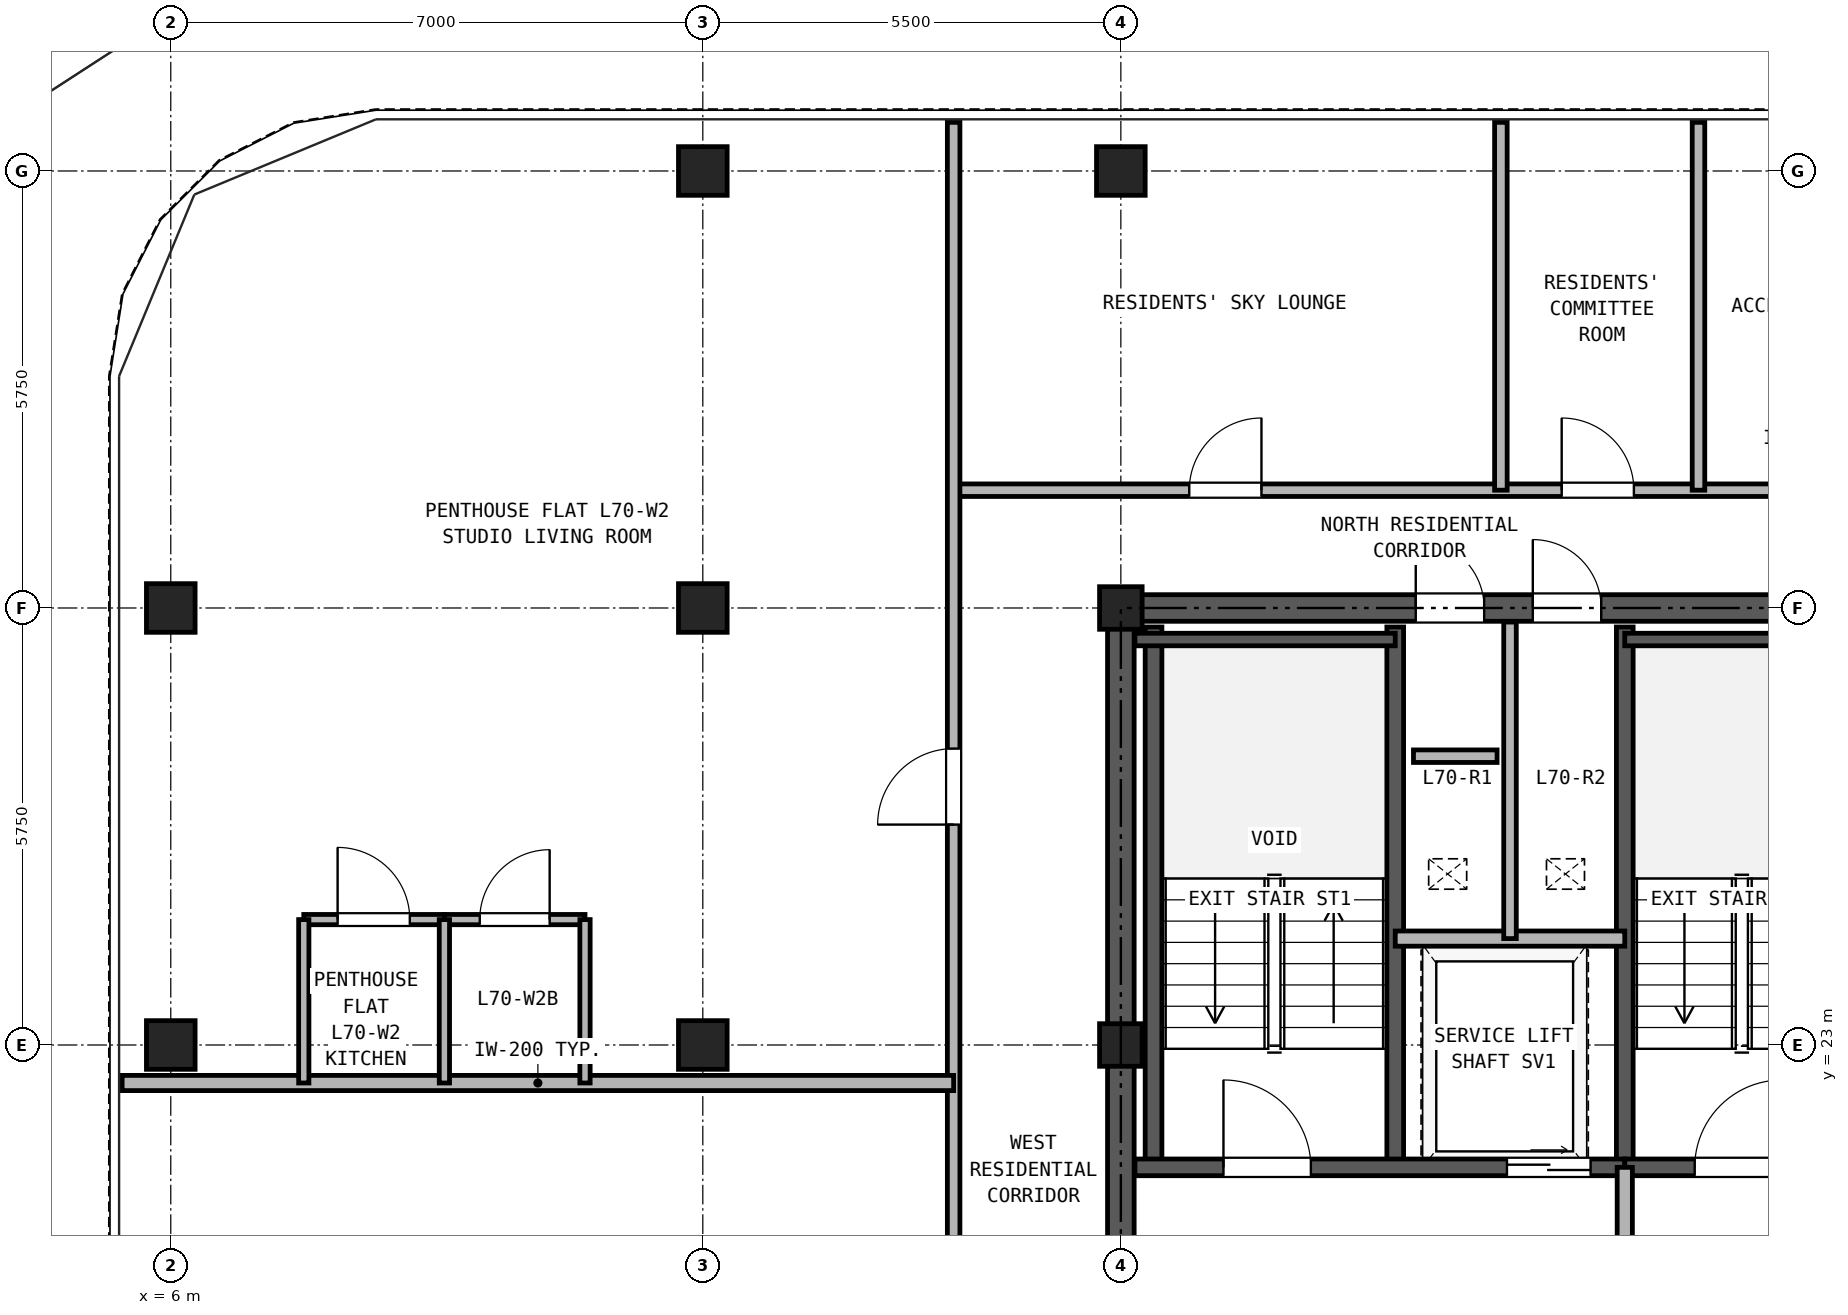
"""IFC4 building model, lengths in metres.
Left out: names, types, materials, properties, quantities, classifications, styles, units other than length and angle.
Written with IfcOpenShell. Run it as: python <this file> out.ifc"""

import sys

from ifc_helpers import new_model, si_unit, direction, frame, frame_2d, origin, origin_2d, place, context, subcontext, project, spatial, rectangle, hollow_rectangle, extrude, source, transform, mapped, element, fill, save


model = new_model("IFC4")
c1 = context("Model", 3, precision=1e-05, world=origin(), true_north=direction((0.0, 1.0)))
c2 = subcontext(c1, "Body", "Model", "MODEL_VIEW")
j1 = project(units=[si_unit("LENGTHUNIT", "METRE"), si_unit("PLANEANGLEUNIT", "RADIAN")], contexts=[c1])
p1 = place(None, origin())
s1 = spatial("IfcSite", under=j1, at=p1, CompositionType="ELEMENT")
p2 = place(p1, origin())
s2 = spatial("IfcBuilding", under=s1, at=p2, CompositionType="ELEMENT")
p3 = place(p2, frame((0.0, 0.0, 245.7)))
s3 = spatial("IfcBuildingStorey", under=s2, at=p3, CompositionType="ELEMENT", Elevation=245.7)
m1 = source(origin(), c2, "Body", "SweptSolid", [
    extrude(hollow_rectangle(XDim=0.64, YDim=0.64, WallThickness=0.035, at=origin_2d()), origin(), (0.0, 0.0, 1.0), 2.98),
])
for number, where, z_axis, x_axis in (
    (1, (13.0, 34.5, 0.0), (0.0, 0.0, 1.0), (1.0, 0.0, 0.0)),
    (2, (18.5, 34.5, 0.0), (0.0, 0.0, 1.0), (1.0, 0.0, 0.0)),
    (3, (6.0, 23.0, 0.0), (0.0, 0.0, 1.0), (1.0, 0.0, 0.0)),
    (4, (6.0, 28.75, 0.0), (0.0, 0.0, 1.0), (1.0, 0.0, 0.0)),
    (5, (13.0, 23.0, 0.0), (0.0, 0.0, 1.0), (1.0, 0.0, 0.0)),
    (6, (13.0, 28.75, 0.0), (0.0, 0.0, 1.0), (1.0, 0.0, 0.0)),
):
    element("IfcColumn", number, at=place(p3, frame(where, z_axis=z_axis, x_axis=x_axis)), inside=s3, PredefinedType="COLUMN", context=c2, shape_type="MappedRepresentation", body=[
        mapped(m1, transform((0.0, 0.0, 0.0), x_axis=(1.0, 0.0, 0.0), y_axis=(0.0, 1.0, 0.0), z_axis=(0.0, 0.0, 1.0), scale=1.0)),
    ])
m2 = source(origin(), c2, "Body", "SweptSolid", [
    extrude(hollow_rectangle(XDim=0.56, YDim=0.56, WallThickness=0.03, at=origin_2d()), origin(), (0.0, 0.0, 1.0), 2.98),
])
for number, where, z_axis, x_axis in (
    (7, (18.5, 23.0, 0.0), (0.0, 0.0, 1.0), (1.0, 0.0, 0.0)),
    (8, (18.5, 28.75, 0.0), (0.0, 0.0, 1.0), (1.0, 0.0, 0.0)),
):
    element("IfcColumn", number, at=place(p3, frame(where, z_axis=z_axis, x_axis=x_axis)), inside=s3, PredefinedType="COLUMN", context=c2, shape_type="MappedRepresentation", body=[
        mapped(m2, transform((0.0, 0.0, 0.0), x_axis=(1.0, 0.0, 0.0), y_axis=(0.0, 1.0, 0.0), z_axis=(0.0, 0.0, 1.0), scale=1.0)),
    ])
p4 = place(p3, frame((18.325, 28.75, 0.0), z_axis=(0.0, 0.0, 1.0), x_axis=(1.0, 0.0, 0.0)))
e9 = element("IfcWall", 9, at=p4, inside=s3, PredefinedType="SHEAR", context=c2, shape_type="SweptSolid", body=[
    extrude(rectangle(XDim=10.35, YDim=0.35, at=frame_2d((5.175, 0.0))), origin(), (0.0, 0.0, 1.0), 2.98),
])
p5 = place(p4, frame((4.055, 0.0, 0.0)))
e10 = element("IfcOpeningElement", 10, at=p5, cuts=e9, PredefinedType="OPENING", context=c2, shape_type="SweptSolid", body=[
    extrude(rectangle(XDim=0.9, YDim=2.05, at=frame_2d((0.45, 1.025))), frame((0.0, 0.185, 0.0), z_axis=(0.0, -1.0, 0.0), x_axis=(1.0, 0.0, 0.0)), (0.0, 0.0, 1.0), 0.37),
])
p6 = place(p4, frame((5.595, 0.0, 0.0)))
e11 = element("IfcOpeningElement", 11, at=p6, cuts=e9, PredefinedType="OPENING", context=c2, shape_type="SweptSolid", body=[
    extrude(rectangle(XDim=0.9, YDim=2.05, at=frame_2d((0.45, 1.025))), frame((0.0, 0.185, 0.0), z_axis=(0.0, -1.0, 0.0), x_axis=(1.0, 0.0, 0.0)), (0.0, 0.0, 1.0), 0.37),
])
p7 = place(p3, frame((18.5, 11.675, 0.0), z_axis=(0.0, 0.0, 1.0), x_axis=(0.0, 1.0, 0.0)))
e12 = element("IfcWall", 12, at=p7, inside=s3, PredefinedType="SHEAR", context=c2, shape_type="SweptSolid", body=[
    extrude(rectangle(XDim=16.9, YDim=0.35, at=frame_2d((8.45, 0.0))), origin(), (0.0, 0.0, 1.0), 2.98),
])
p8 = place(p7, frame((7.475, 0.0, 0.0)))
e13 = element("IfcOpeningElement", 13, at=p8, cuts=e12, PredefinedType="OPENING", context=c2, shape_type="SweptSolid", body=[
    extrude(rectangle(XDim=1.15, YDim=2.2, at=frame_2d((0.575, 1.1))), frame((0.0, 0.185, 0.0), z_axis=(0.0, -1.0, 0.0), x_axis=(1.0, 0.0, 0.0)), (0.0, 0.0, 1.0), 0.37),
])
for number, where, z_axis, x_axis in (
    (14, (18.93, 21.39, 0.0), (0.0, 0.0, 1.0), (0.0, 1.0, 0.0)),
    (15, (22.11, 21.39, 0.0), (0.0, 0.0, 1.0), (0.0, 1.0, 0.0)),
    (16, (25.13, 21.39, 0.0), (0.0, 0.0, 1.0), (0.0, 1.0, 0.0)),
):
    element("IfcWall", number, at=place(p3, frame(where, z_axis=z_axis, x_axis=x_axis)), inside=s3, PredefinedType="SOLIDWALL", context=c2, shape_type="SweptSolid", body=[
        extrude(rectangle(XDim=7.11, YDim=0.22, at=frame_2d((3.555, 0.0))), origin(), (0.0, 0.0, 1.0), 2.98),
    ])
p9 = place(p3, frame((18.685, 28.335, 0.0), z_axis=(0.0, 0.0, 1.0), x_axis=(1.0, 0.0, 0.0)))
e17 = element("IfcWall", 17, at=p9, inside=s3, PredefinedType="PARTITIONING", context=c2, shape_type="SweptSolid", body=[
    extrude(rectangle(XDim=3.425, YDim=0.165, at=frame_2d((1.712, 0.0))), origin(), (0.0, 0.0, 1.0), 2.98),
])
p10 = place(p3, frame((25.13, 28.335, 0.0), z_axis=(0.0, 0.0, 1.0), x_axis=(1.0, 0.0, 0.0)))
e18 = element("IfcWall", 18, at=p10, inside=s3, PredefinedType="PARTITIONING", context=c2, shape_type="SweptSolid", body=[
    extrude(rectangle(XDim=3.185, YDim=0.165, at=frame_2d((1.593, 0.0))), origin(), (0.0, 0.0, 1.0), 2.98),
])
p11 = place(p3, frame((18.685, 21.39, 0.0), z_axis=(0.0, 0.0, 1.0), x_axis=(1.0, 0.0, 0.0)))
e19 = element("IfcWall", 19, at=p11, inside=s3, PredefinedType="SOLIDWALL", context=c2, shape_type="SweptSolid", body=[
    extrude(rectangle(XDim=6.445, YDim=0.22, at=frame_2d((3.222, 0.0))), origin(), (0.0, 0.0, 1.0), 2.98),
])
p12 = place(p11, frame((1.165, 0.0, 0.0)))
e20 = element("IfcOpeningElement", 20, at=p12, cuts=e19, PredefinedType="OPENING", context=c2, shape_type="SweptSolid", body=[
    extrude(rectangle(XDim=1.15, YDim=2.2, at=frame_2d((0.575, 1.1))), frame((0.0, 0.12, 0.0), z_axis=(0.0, -1.0, 0.0), x_axis=(1.0, 0.0, 0.0)), (0.0, 0.0, 1.0), 0.24),
])
p13 = place(p11, frame((4.895, 0.0, 0.0)))
e21 = element("IfcOpeningElement", 21, at=p13, cuts=e19, PredefinedType="OPENING", context=c2, shape_type="SweptSolid", body=[
    extrude(rectangle(XDim=1.1, YDim=2.25, at=frame_2d((0.55, 1.125))), frame((0.0, 0.12, 0.0), z_axis=(0.0, -1.0, 0.0), x_axis=(1.0, 0.0, 0.0)), (0.0, 0.0, 1.0), 0.24),
])
p14 = place(p3, frame((25.13, 21.39, 0.0), z_axis=(0.0, 0.0, 1.0), x_axis=(1.0, 0.0, 0.0)))
e22 = element("IfcWall", 22, at=p14, inside=s3, PredefinedType="SOLIDWALL", context=c2, shape_type="SweptSolid", body=[
    extrude(rectangle(XDim=3.185, YDim=0.22, at=frame_2d((1.593, 0.0))), origin(), (0.0, 0.0, 1.0), 2.98),
])
p15 = place(p14, frame((0.92, 0.0, 0.0)))
e23 = element("IfcOpeningElement", 23, at=p15, cuts=e22, PredefinedType="OPENING", context=c2, shape_type="SweptSolid", body=[
    extrude(rectangle(XDim=1.15, YDim=2.2, at=frame_2d((0.575, 1.1))), frame((0.0, 0.12, 0.0), z_axis=(0.0, -1.0, 0.0), x_axis=(1.0, 0.0, 0.0)), (0.0, 0.0, 1.0), 0.24),
])
p16 = place(p3, frame((22.11, 24.4, 0.0), z_axis=(0.0, 0.0, 1.0), x_axis=(1.0, 0.0, 0.0)))
e24 = element("IfcWall", 24, at=p16, inside=s3, PredefinedType="PARTITIONING", context=c2, shape_type="SweptSolid", body=[
    extrude(rectangle(XDim=3.02, YDim=0.2, at=frame_2d((1.51, 0.0))), origin(), (0.0, 0.0, 1.0), 2.98),
])
p17 = place(p3, frame((23.62, 24.4, 0.0), z_axis=(0.0, 0.0, 1.0), x_axis=(0.0, 1.0, 0.0)))
e25 = element("IfcWall", 25, at=p17, inside=s3, PredefinedType="PARTITIONING", context=c2, shape_type="SweptSolid", body=[
    extrude(rectangle(XDim=4.165, YDim=0.165, at=frame_2d((2.083, 0.0))), origin(), (0.0, 0.0, 1.0), 2.98),
])
p18 = place(p3, frame((25.13, 18.0, 0.0), z_axis=(0.0, 0.0, 1.0), x_axis=(0.0, 1.0, 0.0)))
e26 = element("IfcWall", 26, at=p18, inside=s3, PredefinedType="PARTITIONING", context=c2, shape_type="SweptSolid", body=[
    extrude(rectangle(XDim=3.39, YDim=0.2, at=frame_2d((1.695, 0.0))), origin(), (0.0, 0.0, 1.0), 2.98),
])
p19 = place(p18, frame((1.1, 0.0, 0.0)))
e27 = element("IfcOpeningElement", 27, at=p19, cuts=e26, PredefinedType="OPENING", context=c2, shape_type="SweptSolid", body=[
    extrude(rectangle(XDim=1.15, YDim=2.2, at=frame_2d((0.575, 1.1))), frame((0.0, 0.11, 0.0), z_axis=(0.0, -1.0, 0.0), x_axis=(1.0, 0.0, 0.0)), (0.0, 0.0, 1.0), 0.22),
])
p20 = place(p3, frame((16.3, 30.3, 0.0), z_axis=(0.0, 0.0, 1.0), x_axis=(1.0, 0.0, 0.0)))
e28 = element("IfcWall", 28, at=p20, inside=s3, PredefinedType="PARTITIONING", context=c2, shape_type="SweptSolid", body=[
    extrude(rectangle(XDim=14.4, YDim=0.165, at=frame_2d((7.2, 0.0))), origin(), (0.0, 0.0, 1.0), 2.98),
])
p21 = place(p20, frame((3.1, 0.0, 0.0)))
e29 = element("IfcOpeningElement", 29, at=p21, cuts=e28, PredefinedType="OPENING", context=c2, shape_type="SweptSolid", body=[
    extrude(rectangle(XDim=0.95, YDim=2.15, at=frame_2d((0.475, 1.075))), frame((0.0, 0.093, 0.0), z_axis=(0.0, -1.0, 0.0), x_axis=(1.0, 0.0, 0.0)), (0.0, 0.0, 1.0), 0.185),
])
p22 = place(p20, frame((8.0, 0.0, 0.0)))
e30 = element("IfcOpeningElement", 30, at=p22, cuts=e28, PredefinedType="OPENING", context=c2, shape_type="SweptSolid", body=[
    extrude(rectangle(XDim=0.95, YDim=2.15, at=frame_2d((0.475, 1.075))), frame((0.0, 0.093, 0.0), z_axis=(0.0, -1.0, 0.0), x_axis=(1.0, 0.0, 0.0)), (0.0, 0.0, 1.0), 0.185),
])
p23 = place(p20, frame((10.8, 0.0, 0.0)))
e31 = element("IfcOpeningElement", 31, at=p23, cuts=e28, PredefinedType="OPENING", context=c2, shape_type="SweptSolid", body=[
    extrude(rectangle(XDim=0.92, YDim=2.1, at=frame_2d((0.46, 1.05))), frame((0.0, 0.093, 0.0), z_axis=(0.0, -1.0, 0.0), x_axis=(1.0, 0.0, 0.0)), (0.0, 0.0, 1.0), 0.185),
])
p24 = place(p3, frame((16.3, 11.2, 0.0), z_axis=(0.0, 0.0, 1.0), x_axis=(0.0, 1.0, 0.0)))
e32 = element("IfcWall", 32, at=p24, inside=s3, PredefinedType="PARTITIONING", context=c2, shape_type="SweptSolid", body=[
    extrude(rectangle(XDim=23.94, YDim=0.165, at=frame_2d((11.97, 0.0))), origin(), (0.0, 0.0, 1.0), 2.98),
])
p25 = place(p24, frame((5.15, 0.0, 0.0)))
e33 = element("IfcOpeningElement", 33, at=p25, cuts=e32, PredefinedType="OPENING", context=c2, shape_type="SweptSolid", body=[
    extrude(rectangle(XDim=1.0, YDim=2.15, at=frame_2d((0.5, 1.075))), frame((0.0, 0.093, 0.0), z_axis=(0.0, -1.0, 0.0), x_axis=(1.0, 0.0, 0.0)), (0.0, 0.0, 1.0), 0.185),
])
p26 = place(p24, frame((14.7, 0.0, 0.0)))
e34 = element("IfcOpeningElement", 34, at=p26, cuts=e32, PredefinedType="OPENING", context=c2, shape_type="SweptSolid", body=[
    extrude(rectangle(XDim=1.0, YDim=2.15, at=frame_2d((0.5, 1.075))), frame((0.0, 0.093, 0.0), z_axis=(0.0, -1.0, 0.0), x_axis=(1.0, 0.0, 0.0)), (0.0, 0.0, 1.0), 0.185),
])
p27 = place(p3, frame((5.36, 22.5, 0.0), z_axis=(0.0, 0.0, 1.0), x_axis=(1.0, 0.0, 0.0)))
e35 = element("IfcWall", 35, at=p27, inside=s3, PredefinedType="PARTITIONING", context=c2, shape_type="SweptSolid", body=[
    extrude(rectangle(XDim=10.94, YDim=0.2, at=frame_2d((5.47, 0.0))), origin(), (0.0, 0.0, 1.0), 2.98),
])
p28 = place(p3, frame((7.75, 24.65, 0.0), z_axis=(0.0, 0.0, 1.0), x_axis=(1.0, 0.0, 0.0)))
e36 = element("IfcWall", 36, at=p28, inside=s3, PredefinedType="PARTITIONING", context=c2, shape_type="SweptSolid", body=[
    extrude(rectangle(XDim=1.85, YDim=0.135, at=frame_2d((0.925, 0.0))), origin(), (0.0, 0.0, 1.0), 2.98),
])
p29 = place(p28, frame((0.445, 0.0, 0.0)))
e37 = element("IfcOpeningElement", 37, at=p29, cuts=e36, PredefinedType="OPENING", context=c2, shape_type="SweptSolid", body=[
    extrude(rectangle(XDim=0.95, YDim=2.15, at=frame_2d((0.475, 1.075))), frame((0.0, 0.077, 0.0), z_axis=(0.0, -1.0, 0.0), x_axis=(1.0, 0.0, 0.0)), (0.0, 0.0, 1.0), 0.155),
])
p30 = place(p3, frame((9.6, 24.65, 0.0), z_axis=(0.0, 0.0, 1.0), x_axis=(1.0, 0.0, 0.0)))
e38 = element("IfcWall", 38, at=p30, inside=s3, PredefinedType="PARTITIONING", context=c2, shape_type="SweptSolid", body=[
    extrude(rectangle(XDim=1.85, YDim=0.135, at=frame_2d((0.925, 0.0))), origin(), (0.0, 0.0, 1.0), 2.98),
])
p31 = place(p30, frame((0.465, 0.0, 0.0)))
e39 = element("IfcOpeningElement", 39, at=p31, cuts=e38, PredefinedType="OPENING", context=c2, shape_type="SweptSolid", body=[
    extrude(rectangle(XDim=0.92, YDim=2.1, at=frame_2d((0.46, 1.05))), frame((0.0, 0.077, 0.0), z_axis=(0.0, -1.0, 0.0), x_axis=(1.0, 0.0, 0.0)), (0.0, 0.0, 1.0), 0.155),
])
for number, where, z_axis, x_axis in (
    (40, (7.75, 22.5, 0.0), (0.0, 0.0, 1.0), (0.0, 1.0, 0.0)),
    (41, (9.6, 22.5, 0.0), (0.0, 0.0, 1.0), (0.0, 1.0, 0.0)),
    (42, (11.45, 22.5, 0.0), (0.0, 0.0, 1.0), (0.0, 1.0, 0.0)),
):
    element("IfcWall", number, at=place(p3, frame(where, z_axis=z_axis, x_axis=x_axis)), inside=s3, PredefinedType="PARTITIONING", context=c2, shape_type="SweptSolid", body=[
        extrude(rectangle(XDim=2.15, YDim=0.135, at=frame_2d((1.075, 0.0))), origin(), (0.0, 0.0, 1.0), 2.98),
    ])
for number, where, z_axis, x_axis in (
    (43, (23.5, 30.3, 0.0), (0.0, 0.0, 1.0), (0.0, 1.0, 0.0)),
    (44, (26.1, 30.3, 0.0), (0.0, 0.0, 1.0), (0.0, 1.0, 0.0)),
):
    element("IfcWall", number, at=place(p3, frame(where, z_axis=z_axis, x_axis=x_axis)), inside=s3, PredefinedType="PARTITIONING", context=c2, shape_type="SweptSolid", body=[
        extrude(rectangle(XDim=4.84, YDim=0.165, at=frame_2d((2.42, 0.0))), origin(), (0.0, 0.0, 1.0), 2.98),
    ])
p32 = place(p3, frame((22.35, 26.8, 0.0), z_axis=(0.0, 0.0, 1.0), x_axis=(1.0, 0.0, 0.0)))
e45 = element("IfcWall", 45, at=p32, inside=s3, PredefinedType="PARTITIONING", context=c2, shape_type="SweptSolid", body=[
    extrude(rectangle(XDim=1.1, YDim=0.165, at=frame_2d((0.55, 0.0))), origin(), (0.0, 0.0, 1.0), 2.98),
])
p33 = place(p12, frame((1.15, 0.0, 0.0), z_axis=(0.0, 0.0, 1.0), x_axis=(-1.0, 0.0, 0.0)))
e46 = element("IfcDoor", 46, at=p33, inside=s3, OperationType="SINGLE_SWING_LEFT", PredefinedType="DOOR", context=c2, shape_type="SweptSolid", body=[
    extrude(rectangle(XDim=1.15, YDim=2.2, at=frame_2d((0.575, 1.1))), frame((0.0, 0.025, 0.0), z_axis=(0.0, -1.0, 0.0), x_axis=(1.0, 0.0, 0.0)), (0.0, 0.0, 1.0), 0.05),
])
fill(e20, e46)
p34 = place(p15, frame((1.15, 0.0, 0.0), z_axis=(0.0, 0.0, 1.0), x_axis=(-1.0, 0.0, 0.0)))
e47 = element("IfcDoor", 47, at=p34, inside=s3, OperationType="SINGLE_SWING_RIGHT", PredefinedType="DOOR", context=c2, shape_type="SweptSolid", body=[
    extrude(rectangle(XDim=1.15, YDim=2.2, at=frame_2d((0.575, 1.1))), frame((0.0, 0.025, 0.0), z_axis=(0.0, -1.0, 0.0), x_axis=(1.0, 0.0, 0.0)), (0.0, 0.0, 1.0), 0.05),
])
fill(e23, e47)
p35 = place(p13, frame((1.1, 0.0, 0.0), z_axis=(0.0, 0.0, 1.0), x_axis=(-1.0, 0.0, 0.0)))
e48 = element("IfcDoor", 48, at=p35, inside=s3, OperationType="DOUBLE_DOOR_SLIDING", PredefinedType="DOOR", context=c2, shape_type="SweptSolid", body=[
    extrude(rectangle(XDim=1.1, YDim=2.25, at=frame_2d((0.55, 1.125))), frame((0.0, 0.025, 0.0), z_axis=(0.0, -1.0, 0.0), x_axis=(1.0, 0.0, 0.0)), (0.0, 0.0, 1.0), 0.05),
])
fill(e21, e48)
p36 = place(p5, origin())
e49 = element("IfcDoor", 49, at=p36, inside=s3, OperationType="SINGLE_SWING_LEFT", PredefinedType="DOOR", context=c2, shape_type="SweptSolid", body=[
    extrude(rectangle(XDim=0.9, YDim=2.05, at=frame_2d((0.45, 1.025))), frame((0.0, 0.025, 0.0), z_axis=(0.0, -1.0, 0.0), x_axis=(1.0, 0.0, 0.0)), (0.0, 0.0, 1.0), 0.05),
])
fill(e10, e49)
p37 = place(p6, origin())
e50 = element("IfcDoor", 50, at=p37, inside=s3, OperationType="SINGLE_SWING_LEFT", PredefinedType="DOOR", context=c2, shape_type="SweptSolid", body=[
    extrude(rectangle(XDim=0.9, YDim=2.05, at=frame_2d((0.45, 1.025))), frame((0.0, 0.025, 0.0), z_axis=(0.0, -1.0, 0.0), x_axis=(1.0, 0.0, 0.0)), (0.0, 0.0, 1.0), 0.05),
])
fill(e11, e50)
p38 = place(p29, origin())
e51 = element("IfcDoor", 51, at=p38, inside=s3, OperationType="SINGLE_SWING_LEFT", PredefinedType="DOOR", context=c2, shape_type="SweptSolid", body=[
    extrude(rectangle(XDim=0.95, YDim=2.15, at=frame_2d((0.475, 1.075))), frame((0.0, 0.025, 0.0), z_axis=(0.0, -1.0, 0.0), x_axis=(1.0, 0.0, 0.0)), (0.0, 0.0, 1.0), 0.05),
])
fill(e37, e51)
p39 = place(p31, origin())
e52 = element("IfcDoor", 52, at=p39, inside=s3, OperationType="SINGLE_SWING_RIGHT", PredefinedType="DOOR", context=c2, shape_type="SweptSolid", body=[
    extrude(rectangle(XDim=0.92, YDim=2.1, at=frame_2d((0.46, 1.05))), frame((0.0, 0.025, 0.0), z_axis=(0.0, -1.0, 0.0), x_axis=(1.0, 0.0, 0.0)), (0.0, 0.0, 1.0), 0.05),
])
fill(e39, e52)
p40 = place(p26, origin())
e53 = element("IfcDoor", 53, at=p40, inside=s3, OperationType="SINGLE_SWING_LEFT", PredefinedType="DOOR", context=c2, shape_type="SweptSolid", body=[
    extrude(rectangle(XDim=1.0, YDim=2.15, at=frame_2d((0.5, 1.075))), frame((0.0, 0.025, 0.0), z_axis=(0.0, -1.0, 0.0), x_axis=(1.0, 0.0, 0.0)), (0.0, 0.0, 1.0), 0.05),
])
fill(e34, e53)
p41 = place(p21, origin())
e54 = element("IfcDoor", 54, at=p41, inside=s3, OperationType="SINGLE_SWING_RIGHT", PredefinedType="DOOR", context=c2, shape_type="SweptSolid", body=[
    extrude(rectangle(XDim=0.95, YDim=2.15, at=frame_2d((0.475, 1.075))), frame((0.0, 0.025, 0.0), z_axis=(0.0, -1.0, 0.0), x_axis=(1.0, 0.0, 0.0)), (0.0, 0.0, 1.0), 0.05),
])
fill(e29, e54)
p42 = place(p22, origin())
e55 = element("IfcDoor", 55, at=p42, inside=s3, OperationType="SINGLE_SWING_LEFT", PredefinedType="DOOR", context=c2, shape_type="SweptSolid", body=[
    extrude(rectangle(XDim=0.95, YDim=2.15, at=frame_2d((0.475, 1.075))), frame((0.0, 0.025, 0.0), z_axis=(0.0, -1.0, 0.0), x_axis=(1.0, 0.0, 0.0)), (0.0, 0.0, 1.0), 0.05),
])
fill(e30, e55)
save(model, sys.argv[1])
